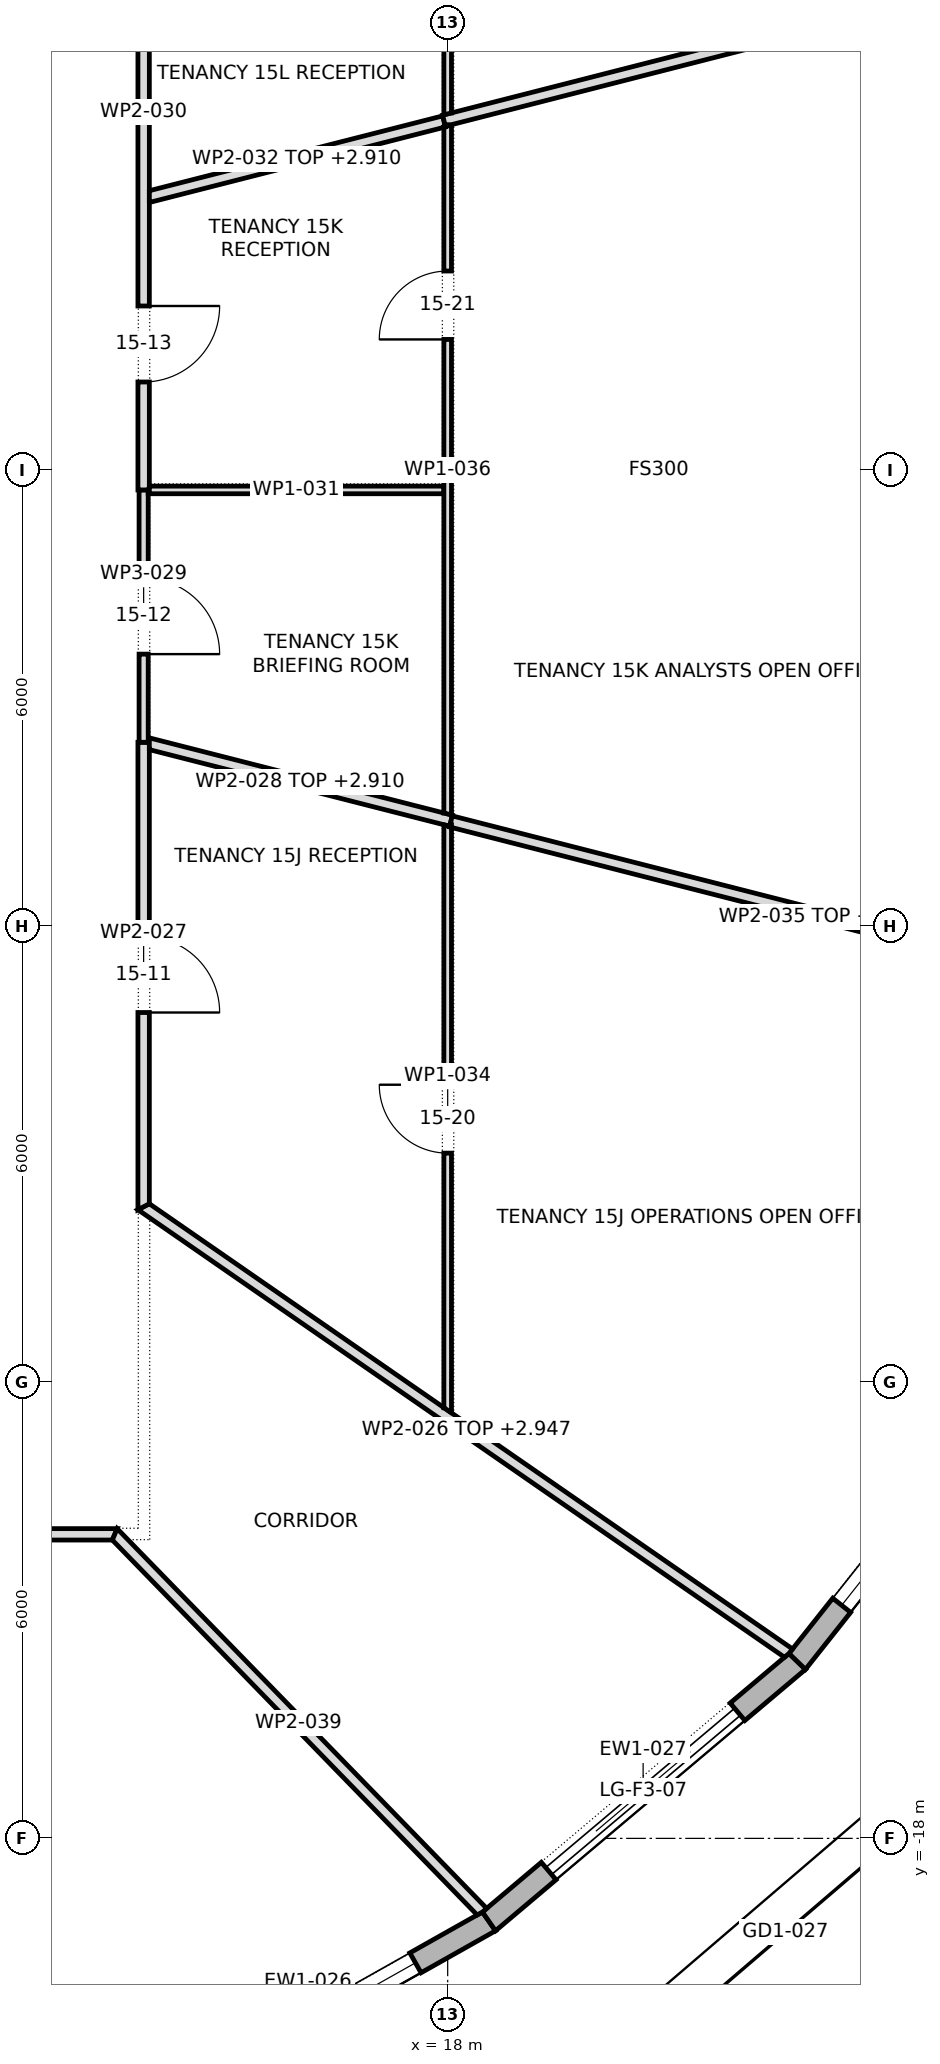
"""IFC4 building model, lengths in metres.
Left out: names, types, materials, properties, quantities, classifications, styles, units other than length and angle.
Written with IfcOpenShell. Run it as: python <this file> out.ifc"""

import sys

from ifc_helpers import new_model, si_unit, direction, frame, frame_2d, origin, place, context, subcontext, project, spatial, polyline, rectangle, outline, extrude, element, fill, save


model = new_model("IFC4")
c1 = context("Model", 3, precision=1e-05, world=origin(), true_north=direction((0.0, 1.0)))
c2 = subcontext(c1, "Body", "Model", "MODEL_VIEW")
j1 = project(units=[si_unit("LENGTHUNIT", "METRE"), si_unit("PLANEANGLEUNIT", "RADIAN")], contexts=[c1])
p1 = place(None, origin())
s1 = spatial("IfcSite", under=j1, at=p1, CompositionType="ELEMENT")
p2 = place(p1, origin())
s2 = spatial("IfcBuilding", under=s1, at=p2, CompositionType="ELEMENT")
p3 = place(p2, frame((0.0, 0.0, 214.9)))
s3 = spatial("IfcBuildingStorey", under=s2, at=p3, CompositionType="ELEMENT", Elevation=214.9)
p4 = place(p3, frame((13.777, -21.778, 0.0), z_axis=(0.0, 0.0, 1.0), x_axis=(0.871207038577, 0.490915772749, 0.0)))
e1 = element("IfcWall", 1, at=p4, inside=s3, PredefinedType="STANDARD", context=c2, shape_type="SweptSolid", body=[
    extrude(outline(polyline([(-0.013, -0.15), (5.485, -0.15), (5.457, 0.15), (0.013, 0.15), (-0.013, -0.15)])), origin(), (0.0, 0.0, 1.0), 3.7),
])
p5 = place(p4, frame((1.111, 0.0, 0.6)))
e2 = element("IfcOpeningElement", 2, at=p5, cuts=e1, PredefinedType="OPENING", context=c2, shape_type="SweptSolid", body=[
    extrude(rectangle(XDim=3.25, YDim=2.65, at=frame_2d((1.625, 1.325))), frame((0.0, 0.162, 0.0), z_axis=(0.0, -1.0, 0.0), x_axis=(1.0, 0.0, 0.0)), (0.0, 0.0, 1.0), 0.324),
])
p6 = place(p3, frame((18.543, -19.092, 0.0), z_axis=(0.0, 0.0, 1.0), x_axis=(0.764397795062, 0.644744919255, 0.0)))
e3 = element("IfcWall", 3, at=p6, inside=s3, PredefinedType="STANDARD", context=c2, shape_type="SweptSolid", body=[
    extrude(outline(polyline([(-0.014, -0.15), (5.32, -0.15), (5.29, 0.15), (0.014, 0.15), (-0.014, -0.15)])), origin(), (0.0, 0.0, 1.0), 3.7),
])
p7 = place(p6, frame((1.028, 0.0, 0.0)))
e4 = element("IfcOpeningElement", 4, at=p7, cuts=e3, PredefinedType="OPENING", context=c2, shape_type="SweptSolid", body=[
    extrude(rectangle(XDim=3.25, YDim=3.25, at=frame_2d((1.625, 1.625))), frame((0.0, 0.162, 0.0), z_axis=(0.0, -1.0, 0.0), x_axis=(1.0, 0.0, 0.0)), (0.0, 0.0, 1.0), 0.324),
])
p8 = place(p3, frame((22.599, -15.672, 0.0), z_axis=(0.0, 0.0, 1.0), x_axis=(0.621017151557, 0.783796974651, 0.0)))
e5 = element("IfcWall", 5, at=p8, inside=s3, PredefinedType="STANDARD", context=c2, shape_type="SweptSolid", body=[
    extrude(outline(polyline([(-0.015, -0.15), (5.15, -0.15), (5.118, 0.15), (0.015, 0.15), (-0.015, -0.15)])), origin(), (0.0, 0.0, 1.0), 3.7),
])
p9 = place(p8, frame((0.942, 0.0, 0.6)))
e6 = element("IfcOpeningElement", 6, at=p9, cuts=e5, PredefinedType="OPENING", context=c2, shape_type="SweptSolid", body=[
    extrude(rectangle(XDim=3.25, YDim=2.65, at=frame_2d((1.625, 1.325))), frame((0.0, 0.162, 0.0), z_axis=(0.0, -1.0, 0.0), x_axis=(1.0, 0.0, 0.0)), (0.0, 0.0, 1.0), 0.324),
])
p10 = place(p3, frame((-13.652, -14.0, 0.0), z_axis=(0.0, 0.0, 1.0), x_axis=(1.0, 0.0, 0.0)))
e7 = element("IfcWall", 7, at=p10, inside=s3, PredefinedType="PARTITIONING", context=c2, shape_type="SweptSolid", body=[
    extrude(outline(polyline([(0.063, -0.075), (2.004, -0.075), (3.946, -0.075), (5.887, -0.075), (7.828, -0.075), (9.769, -0.075), (11.71, -0.075), (13.652, -0.075), (15.593, -0.075), (17.534, -0.075), (19.475, -0.075), (21.417, -0.075), (23.358, -0.075), (25.299, -0.075), (27.24, -0.075), (27.303, 0.075), (27.303, 0.075), (25.353, 0.075), (23.403, 0.075), (21.453, 0.075), (19.502, 0.075), (17.552, 0.075), (15.602, 0.075), (13.652, 0.075), (11.701, 0.075), (9.751, 0.075), (7.801, 0.075), (5.851, 0.075), (3.9, 0.075), (1.95, 0.075), (0.0, 0.075), (0.0, 0.075), (0.063, -0.075)])), origin(), (0.0, 0.0, 1.0), 3.7),
])
p11 = place(p10, frame((5.527, 0.0, 0.0)))
e8 = element("IfcOpeningElement", 8, at=p11, cuts=e7, PredefinedType="OPENING", context=c2, shape_type="SweptSolid", body=[
    extrude(rectangle(XDim=1.0, YDim=2.1, at=frame_2d((0.5, 1.05))), frame((0.0, 0.087, 0.0), z_axis=(0.0, -1.0, 0.0), x_axis=(1.0, 0.0, 0.0)), (0.0, 0.0, 1.0), 0.174),
])
p12 = place(p10, frame((14.857, 0.0, 0.0)))
e9 = element("IfcOpeningElement", 9, at=p12, cuts=e7, PredefinedType="OPENING", context=c2, shape_type="SweptSolid", body=[
    extrude(rectangle(XDim=1.0, YDim=2.1, at=frame_2d((0.5, 1.05))), frame((0.0, 0.087, 0.0), z_axis=(0.0, -1.0, 0.0), x_axis=(1.0, 0.0, 0.0)), (0.0, 0.0, 1.0), 0.174),
])
p13 = place(p10, frame((22.482, 0.0, 0.0)))
e10 = element("IfcOpeningElement", 10, at=p13, cuts=e7, PredefinedType="OPENING", context=c2, shape_type="SweptSolid", body=[
    extrude(rectangle(XDim=1.0, YDim=2.1, at=frame_2d((0.5, 1.05))), frame((0.0, 0.087, 0.0), z_axis=(0.0, -1.0, 0.0), x_axis=(1.0, 0.0, 0.0)), (0.0, 0.0, 1.0), 0.174),
])
p14 = place(p3, frame((13.968, -9.667, 0.0), z_axis=(0.0, 0.0, 1.0), x_axis=(0.822219313141, -0.56917080134, 0.0)))
e11 = element("IfcWall", 11, at=p14, inside=s3, PredefinedType="PARTITIONING", context=c2, shape_type="SweptSolid", body=[
    extrude(outline(polyline([(0.0, -0.075), (1.724, -0.075), (3.448, -0.075), (5.173, -0.075), (6.897, -0.075), (8.621, -0.075), (10.345, -0.075), (10.365, 0.0), (10.37, 0.066), (10.37, 0.075), (8.511, 0.075), (6.653, 0.075), (4.795, 0.075), (4.792, 0.073), (4.791, 0.075), (3.22, 0.075), (1.65, 0.075), (0.079, 0.075), (0.039, -0.0), (0.0, -0.075)])), origin(), (0.0, 0.0, 1.0), 2.947),
])
p15 = place(p3, frame((14.0, -3.58, 0.0), z_axis=(0.0, 0.0, 1.0), x_axis=(0.0, -1.0, 0.0)))
e12 = element("IfcWall", 12, at=p15, inside=s3, PredefinedType="PARTITIONING", context=c2, shape_type="SweptSolid", body=[
    extrude(outline(polyline([(6.149, -0.075), (6.149, -0.075), (6.071, 0.075), (4.553, 0.075), (3.035, 0.075), (1.518, 0.075), (0.0, 0.075), (0.0, -0.075), (1.537, -0.075), (3.075, -0.075), (4.612, -0.075), (6.149, -0.075)])), origin(), (0.0, 0.0, 1.0), 3.7),
])
p16 = place(p15, frame((2.555, 0.0, 0.0)))
e13 = element("IfcOpeningElement", 13, at=p16, cuts=e12, PredefinedType="OPENING", context=c2, shape_type="SweptSolid", body=[
    extrude(rectangle(XDim=1.0, YDim=2.1, at=frame_2d((0.5, 1.05))), frame((0.0, 0.087, 0.0), z_axis=(0.0, -1.0, 0.0), x_axis=(1.0, 0.0, 0.0)), (0.0, 0.0, 1.0), 0.174),
])
p17 = place(p3, frame((14.042, -3.591, 0.0), z_axis=(0.0, 0.0, 1.0), x_axis=(0.968991510142, -0.247094017071, 0.0)))
e14 = element("IfcWall", 14, at=p17, inside=s3, PredefinedType="PARTITIONING", context=c2, shape_type="SweptSolid", body=[
    extrude(outline(polyline([(4.131, 0.075), (4.015, 0.075), (4.014, 0.075), (4.014, 0.075), (2.676, 0.075), (1.338, 0.075), (0.0, 0.075), (0.0, 0.074), (0.015, 0.015), (0.03, 0.019), (0.053, -0.075), (1.413, -0.075), (2.772, -0.075), (4.131, -0.075), (4.131, 0.075)])), origin(), (0.0, 0.0, 1.0), 2.91),
])
p18 = place(p3, frame((14.0, -0.26, 0.0), z_axis=(0.0, 0.0, 1.0), x_axis=(0.0, -1.0, 0.0)))
e15 = element("IfcWall", 15, at=p18, inside=s3, PredefinedType="PARTITIONING", context=c2, shape_type="SweptSolid", body=[
    extrude(rectangle(XDim=3.32, YDim=0.12, at=frame_2d((1.66, 0.0))), origin(), (0.0, 0.0, 1.0), 3.7),
])
p19 = place(p18, frame((1.16, 0.0, 0.0)))
e16 = element("IfcOpeningElement", 16, at=p19, cuts=e15, PredefinedType="OPENING", context=c2, shape_type="SweptSolid", body=[
    extrude(rectangle(XDim=1.0, YDim=2.1, at=frame_2d((0.5, 1.05))), frame((0.0, 0.072, 0.0), z_axis=(0.0, -1.0, 0.0), x_axis=(1.0, 0.0, 0.0)), (0.0, 0.0, 1.0), 0.144),
])
p20 = place(p3, frame((14.0, -0.26, 0.0), z_axis=(0.0, 0.0, 1.0), x_axis=(0.0, 1.0, 0.0)))
e17 = element("IfcWall", 17, at=p20, inside=s3, PredefinedType="PARTITIONING", context=c2, shape_type="SweptSolid", body=[
    extrude(outline(polyline([(0.0, -0.075), (1.982, -0.075), (3.964, -0.075), (5.947, -0.075), (7.929, -0.075), (9.911, -0.075), (9.989, 0.075), (9.989, 0.075), (7.991, 0.075), (5.994, 0.075), (3.996, 0.075), (1.998, 0.075), (0.0, 0.075), (0.0, -0.075)])), origin(), (0.0, 0.0, 1.0), 3.7),
])
p21 = place(p20, frame((1.42, 0.0, 0.0)))
e18 = element("IfcOpeningElement", 18, at=p21, cuts=e17, PredefinedType="OPENING", context=c2, shape_type="SweptSolid", body=[
    extrude(rectangle(XDim=1.0, YDim=2.1, at=frame_2d((0.5, 1.05))), frame((0.0, 0.087, 0.0), z_axis=(0.0, -1.0, 0.0), x_axis=(1.0, 0.0, 0.0)), (0.0, 0.0, 1.0), 0.174),
])
p22 = place(p20, frame((6.395, 0.0, 0.0)))
e19 = element("IfcOpeningElement", 19, at=p22, cuts=e17, PredefinedType="OPENING", context=c2, shape_type="SweptSolid", body=[
    extrude(rectangle(XDim=1.0, YDim=2.1, at=frame_2d((0.5, 1.05))), frame((0.0, 0.087, 0.0), z_axis=(0.0, -1.0, 0.0), x_axis=(1.0, 0.0, 0.0)), (0.0, 0.0, 1.0), 0.174),
])
p23 = place(p3, frame((14.061, -0.26, 0.0), z_axis=(0.0, 0.0, 1.0), x_axis=(1.0, 0.0, 0.0)))
e20 = element("IfcWall", 20, at=p23, inside=s3, PredefinedType="PARTITIONING", context=c2, shape_type="SweptSolid", body=[
    extrude(outline(polyline([(3.889, 0.05), (1.952, 0.05), (0.014, 0.05), (0.014, 0.0), (0.0, 0.0), (0.0, -0.05), (1.945, -0.05), (3.889, -0.05), (3.889, 0.05)])), origin(), (0.0, 0.0, 1.0), 3.7),
])
p24 = place(p3, frame((14.057, 3.594, 0.0), z_axis=(0.0, 0.0, 1.0), x_axis=(0.968992302027, 0.247090911634, 0.0)))
e21 = element("IfcWall", 21, at=p24, inside=s3, PredefinedType="PARTITIONING", context=c2, shape_type="SweptSolid", body=[
    extrude(outline(polyline([(0.0, -0.075), (2.0, -0.075), (3.999, -0.075), (3.999, -0.073), (4.005, -0.075), (4.021, -0.075), (4.021, 0.075), (2.029, 0.075), (0.038, 0.075), (0.0, -0.074), (0.0, -0.075)])), origin(), (0.0, 0.0, 1.0), 2.91),
])
p25 = place(p3, frame((18.0, -4.665, 0.0), z_axis=(0.0, 0.0, 1.0), x_axis=(0.0, -1.0, 0.0)))
e22 = element("IfcWall", 22, at=p25, inside=s3, PredefinedType="PARTITIONING", context=c2, shape_type="SweptSolid", body=[
    extrude(outline(polyline([(0.0, -0.05), (1.917, -0.05), (3.834, -0.05), (5.751, -0.05), (7.668, -0.05), (7.737, 0.05), (7.737, 0.05), (5.812, 0.05), (3.886, 0.05), (1.961, 0.05), (0.035, 0.05), (0.029, 0.025), (0.0, 0.032), (0.0, 0.031), (0.019, 0.026), (0.0, -0.048), (0.0, -0.05)])), origin(), (0.0, 0.0, 1.0), 3.7),
])
p26 = place(p25, frame((3.42, 0.0, 0.0)))
e23 = element("IfcOpeningElement", 23, at=p26, cuts=e22, PredefinedType="OPENING", context=c2, shape_type="SweptSolid", body=[
    extrude(rectangle(XDim=0.9, YDim=2.1, at=frame_2d((0.45, 1.05))), frame((0.0, 0.062, 0.0), z_axis=(0.0, -1.0, 0.0), x_axis=(1.0, 0.0, 0.0)), (0.0, 0.0, 1.0), 0.124),
])
p27 = place(p3, frame((18.042, -4.621, 0.0), z_axis=(0.0, 0.0, 1.0), x_axis=(0.968898746972, -0.247457507698, 0.0)))
e24 = element("IfcWall", 24, at=p27, inside=s3, PredefinedType="PARTITIONING", context=c2, shape_type="SweptSolid", body=[
    extrude(outline(polyline([(0.027, -0.075), (1.706, -0.075), (3.385, -0.075), (5.063, -0.075), (6.741, -0.075), (8.42, -0.075), (10.098, -0.075), (10.113, -0.008), (10.113, 0.075), (8.427, 0.075), (6.742, 0.075), (5.056, 0.075), (3.371, 0.075), (1.686, 0.075), (0.0, 0.075), (0.0, -0.045), (0.019, -0.041), (0.027, -0.075)])), origin(), (0.0, 0.0, 1.0), 2.91),
])
p28 = place(p3, frame((18.0, -4.535, 0.0), z_axis=(0.0, 0.0, 1.0), x_axis=(0.0, 1.0, 0.0)))
e25 = element("IfcWall", 25, at=p28, inside=s3, PredefinedType="PARTITIONING", context=c2, shape_type="SweptSolid", body=[
    extrude(outline(polyline([(9.08, -0.05), (9.08, -0.048), (9.06, 0.03), (9.08, 0.035), (9.08, 0.036), (9.05, 0.029), (9.045, 0.05), (7.471, 0.05), (5.898, 0.05), (4.325, 0.05), (4.325, 0.05), (4.225, 0.05), (4.225, 0.05), (2.825, 0.05), (1.425, 0.05), (0.025, 0.05), (0.0, -0.048), (0.0, -0.05), (1.816, -0.05), (3.632, -0.05), (5.448, -0.05), (7.264, -0.05), (9.08, -0.05)])), origin(), (0.0, 0.0, 1.0), 3.7),
])
p29 = place(p28, frame((6.255, 0.0, 0.0)))
e26 = element("IfcOpeningElement", 26, at=p29, cuts=e25, PredefinedType="OPENING", context=c2, shape_type="SweptSolid", body=[
    extrude(rectangle(XDim=0.9, YDim=2.1, at=frame_2d((0.45, 1.05))), frame((0.0, 0.062, 0.0), z_axis=(0.0, -1.0, 0.0), x_axis=(1.0, 0.0, 0.0)), (0.0, 0.0, 1.0), 0.124),
])
p30 = place(p3, frame((17.952, 4.598, 0.0), z_axis=(0.0, 0.0, 1.0), x_axis=(0.968895869382, 0.247468774381, 0.0)))
e27 = element("IfcWall", 27, at=p30, inside=s3, PredefinedType="PARTITIONING", context=c2, shape_type="SweptSolid", body=[
    extrude(outline(polyline([(10.206, -0.075), (10.206, 0.008), (10.192, 0.075), (8.513, 0.075), (6.835, 0.075), (5.156, 0.075), (3.478, 0.075), (1.799, 0.075), (0.121, 0.075), (0.121, 0.075), (0.12, 0.075), (0.0, 0.075), (0.0, -0.054), (0.081, -0.075), (1.768, -0.075), (3.456, -0.075), (5.143, -0.075), (6.831, -0.075), (8.518, -0.075), (10.206, -0.075)])), origin(), (0.0, 0.0, 1.0), 2.91),
])
p31 = place(p3, frame((18.0, 12.402, 0.0), z_axis=(0.0, 0.0, 1.0), x_axis=(0.0, -1.0, 0.0)))
e28 = element("IfcWall", 28, at=p31, inside=s3, PredefinedType="PARTITIONING", context=c2, shape_type="SweptSolid", body=[
    extrude(outline(polyline([(7.727, -0.05), (7.727, -0.048), (7.702, 0.05), (5.776, 0.05), (3.851, 0.05), (1.926, 0.05), (0.0, 0.05), (0.0, 0.05), (0.069, -0.05), (1.984, -0.05), (3.898, -0.05), (5.812, -0.05), (7.727, -0.05)])), origin(), (0.0, 0.0, 1.0), 3.7),
])
p32 = place(p31, frame((3.417, 0.0, 0.0)))
e29 = element("IfcOpeningElement", 29, at=p32, cuts=e28, PredefinedType="OPENING", context=c2, shape_type="SweptSolid", body=[
    extrude(rectangle(XDim=0.9, YDim=2.1, at=frame_2d((0.45, 1.05))), frame((0.0, 0.062, 0.0), z_axis=(0.0, -1.0, 0.0), x_axis=(1.0, 0.0, 0.0)), (0.0, 0.0, 1.0), 0.124),
])
p33 = place(p3, frame((18.459, -18.973, 0.0), z_axis=(0.0, 0.0, 1.0), x_axis=(-0.697374409368, 0.716707006494, 0.0)))
e30 = element("IfcWall", 30, at=p33, inside=s3, PredefinedType="PARTITIONING", context=c2, shape_type="SweptSolid", body=[
    extrude(outline(polyline([(0.0, -0.075), (1.743, -0.075), (3.485, -0.075), (5.228, -0.075), (6.971, -0.075), (6.939, 0.0), (6.907, 0.075), (5.187, 0.075), (3.466, 0.075), (1.746, 0.075), (0.025, 0.075), (0.005, -0.002), (0.0, -0.069), (0.0, -0.075)])), origin(), (0.0, 0.0, 1.0), 3.7),
])
p34 = place(p5, origin())
e31 = element("IfcWindow", 31, at=p34, inside=s3, PartitioningType="TRIPLE_PANEL_VERTICAL", PredefinedType="WINDOW", context=c2, shape_type="SweptSolid", body=[
    extrude(rectangle(XDim=3.25, YDim=2.65, at=frame_2d((1.625, 1.325))), frame((0.0, 0.03, 0.0), z_axis=(0.0, -1.0, 0.0), x_axis=(1.0, 0.0, 0.0)), (0.0, 0.0, 1.0), 0.06),
])
fill(e2, e31)
p35 = place(p7, origin())
e32 = element("IfcDoor", 32, at=p35, inside=s3, OperationType="DOUBLE_DOOR_SLIDING", PredefinedType="DOOR", context=c2, shape_type="SweptSolid", body=[
    extrude(rectangle(XDim=3.25, YDim=3.25, at=frame_2d((1.625, 1.625))), frame((0.0, 0.025, 0.0), z_axis=(0.0, -1.0, 0.0), x_axis=(1.0, 0.0, 0.0)), (0.0, 0.0, 1.0), 0.05),
])
fill(e4, e32)
p36 = place(p9, origin())
e33 = element("IfcWindow", 33, at=p36, inside=s3, PartitioningType="TRIPLE_PANEL_VERTICAL", PredefinedType="WINDOW", context=c2, shape_type="SweptSolid", body=[
    extrude(rectangle(XDim=3.25, YDim=2.65, at=frame_2d((1.625, 1.325))), frame((0.0, 0.03, 0.0), z_axis=(0.0, -1.0, 0.0), x_axis=(1.0, 0.0, 0.0)), (0.0, 0.0, 1.0), 0.06),
])
fill(e6, e33)
p37 = place(p16, origin())
e34 = element("IfcDoor", 34, at=p37, inside=s3, OperationType="SINGLE_SWING_LEFT", PredefinedType="DOOR", context=c2, shape_type="SweptSolid", body=[
    extrude(rectangle(XDim=1.0, YDim=2.1, at=frame_2d((0.5, 1.05))), frame((0.0, 0.025, 0.0), z_axis=(0.0, -1.0, 0.0), x_axis=(1.0, 0.0, 0.0)), (0.0, 0.0, 1.0), 0.05),
])
fill(e13, e34)
p38 = place(p19, origin())
e35 = element("IfcDoor", 35, at=p38, inside=s3, OperationType="SINGLE_SWING_LEFT", PredefinedType="DOOR", context=c2, shape_type="SweptSolid", body=[
    extrude(rectangle(XDim=1.0, YDim=2.1, at=frame_2d((0.5, 1.05))), frame((0.0, 0.025, 0.0), z_axis=(0.0, -1.0, 0.0), x_axis=(1.0, 0.0, 0.0)), (0.0, 0.0, 1.0), 0.05),
])
fill(e16, e35)
p39 = place(p21, frame((1.0, 0.0, 0.0), z_axis=(0.0, 0.0, 1.0), x_axis=(-1.0, 0.0, 0.0)))
e36 = element("IfcDoor", 36, at=p39, inside=s3, OperationType="SINGLE_SWING_RIGHT", PredefinedType="DOOR", context=c2, shape_type="SweptSolid", body=[
    extrude(rectangle(XDim=1.0, YDim=2.1, at=frame_2d((0.5, 1.05))), frame((0.0, 0.025, 0.0), z_axis=(0.0, -1.0, 0.0), x_axis=(1.0, 0.0, 0.0)), (0.0, 0.0, 1.0), 0.05),
])
fill(e18, e36)
p40 = place(p26, frame((0.9, 0.0, 0.0), z_axis=(0.0, 0.0, 1.0), x_axis=(-1.0, 0.0, 0.0)))
e37 = element("IfcDoor", 37, at=p40, inside=s3, OperationType="SINGLE_SWING_LEFT", PredefinedType="DOOR", context=c2, shape_type="SweptSolid", body=[
    extrude(rectangle(XDim=0.9, YDim=2.1, at=frame_2d((0.45, 1.05))), frame((0.0, 0.025, 0.0), z_axis=(0.0, -1.0, 0.0), x_axis=(1.0, 0.0, 0.0)), (0.0, 0.0, 1.0), 0.05),
])
fill(e23, e37)
p41 = place(p29, origin())
e38 = element("IfcDoor", 38, at=p41, inside=s3, OperationType="SINGLE_SWING_RIGHT", PredefinedType="DOOR", context=c2, shape_type="SweptSolid", body=[
    extrude(rectangle(XDim=0.9, YDim=2.1, at=frame_2d((0.45, 1.05))), frame((0.0, 0.025, 0.0), z_axis=(0.0, -1.0, 0.0), x_axis=(1.0, 0.0, 0.0)), (0.0, 0.0, 1.0), 0.05),
])
fill(e26, e38)
save(model, sys.argv[1])
